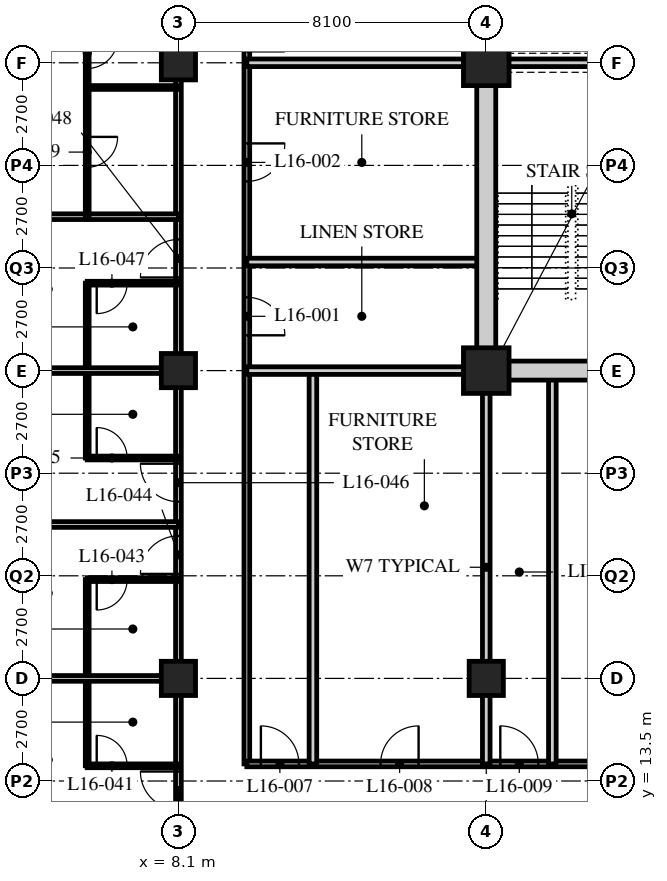
"""IFC4 building model, lengths in metres.
Left out: names, types, materials, properties, quantities, classifications, styles, units other than length and angle.
Written with IfcOpenShell. Run it as: python <this file> out.ifc"""

import sys

from ifc_helpers import new_model, si_unit, direction, frame, frame_2d, origin, origin_2d, place, context, subcontext, project, spatial, rectangle, hollow_rectangle, extrude, element, fill, save


model = new_model("IFC4")
c1 = context("Model", 3, precision=1e-05, world=origin(), true_north=direction((0.0, 1.0)))
c2 = subcontext(c1, "Body", "Model", "MODEL_VIEW")
j1 = project(units=[si_unit("LENGTHUNIT", "METRE"), si_unit("PLANEANGLEUNIT", "RADIAN")], contexts=[c1])
p1 = place(None, origin())
s1 = spatial("IfcSite", under=j1, at=p1, CompositionType="ELEMENT")
p2 = place(p1, origin())
s2 = spatial("IfcBuilding", under=s1, at=p2, CompositionType="ELEMENT")
p3 = place(p2, frame((0.0, 0.0, 67.0)))
s3 = spatial("IfcBuildingStorey", under=s2, at=p3, CompositionType="ELEMENT", Elevation=67.0)
for number, where, z_axis, x_axis in (
    (1, (8.1, 16.2, 0.0), (0.0, 0.0, 1.0), (1.0, 0.0, 0.0)),
    (2, (8.1, 24.3, 0.0), (0.0, 0.0, 1.0), (1.0, 0.0, 0.0)),
    (3, (8.1, 32.4, 0.0), (0.0, 0.0, 1.0), (1.0, 0.0, 0.0)),
    (4, (16.2, 16.2, 0.0), (0.0, 0.0, 1.0), (1.0, 0.0, 0.0)),
):
    element("IfcColumn", number, at=place(p3, frame(where, z_axis=z_axis, x_axis=x_axis)), inside=s3, PredefinedType="COLUMN", context=c2, shape_type="SweptSolid", body=[
        extrude(hollow_rectangle(XDim=0.9, YDim=0.9, WallThickness=0.09, at=origin_2d()), origin(), (0.0, 0.0, 1.0), 3.4),
    ])
for number, where, z_axis, x_axis in (
    (5, (16.2, 24.3, 0.0), (0.0, 0.0, 1.0), (1.0, 0.0, 0.0)),
    (6, (16.2, 32.4, 0.0), (0.0, 0.0, 1.0), (1.0, 0.0, 0.0)),
):
    element("IfcColumn", number, at=place(p3, frame(where, z_axis=z_axis, x_axis=x_axis)), inside=s3, PredefinedType="COLUMN", context=c2, shape_type="SweptSolid", body=[
        extrude(hollow_rectangle(XDim=1.2, YDim=1.2, WallThickness=0.12, at=origin_2d()), origin(), (0.0, 0.0, 1.0), 3.4),
    ])
p4 = place(p3, frame((8.1, 12.15, 0.0), z_axis=(0.0, 0.0, 1.0), x_axis=(0.0, 1.0, 0.0)))
e7 = element("IfcWall", 7, at=p4, inside=s3, PredefinedType="PARTITIONING", context=c2, shape_type="SweptSolid", body=[
    extrude(rectangle(XDim=30.15, YDim=0.15, at=frame_2d((15.075, 0.0))), origin(), (0.0, 0.0, 1.0), 2.578),
])
p5 = place(p4, frame((0.6, 0.0, 0.0)))
e8 = element("IfcOpeningElement", 8, at=p5, cuts=e7, PredefinedType="OPENING", context=c2, shape_type="SweptSolid", body=[
    extrude(rectangle(XDim=1.0, YDim=2.1, at=frame_2d((0.5, 1.05))), frame((0.0, 0.085, 0.0), z_axis=(0.0, -1.0, 0.0), x_axis=(1.0, 0.0, 0.0)), (0.0, 0.0, 1.0), 0.17),
])
p6 = place(p4, frame((6.8, 0.0, 0.0)))
e9 = element("IfcOpeningElement", 9, at=p6, cuts=e7, PredefinedType="OPENING", context=c2, shape_type="SweptSolid", body=[
    extrude(rectangle(XDim=1.0, YDim=2.1, at=frame_2d((0.5, 1.05))), frame((0.0, 0.085, 0.0), z_axis=(0.0, -1.0, 0.0), x_axis=(1.0, 0.0, 0.0)), (0.0, 0.0, 1.0), 0.17),
])
p7 = place(p4, frame((8.7, 0.0, 0.0)))
e10 = element("IfcOpeningElement", 10, at=p7, cuts=e7, PredefinedType="OPENING", context=c2, shape_type="SweptSolid", body=[
    extrude(rectangle(XDim=1.0, YDim=2.1, at=frame_2d((0.5, 1.05))), frame((0.0, 0.085, 0.0), z_axis=(0.0, -1.0, 0.0), x_axis=(1.0, 0.0, 0.0)), (0.0, 0.0, 1.0), 0.17),
])
p8 = place(p4, frame((14.6, 0.0, 0.0)))
e11 = element("IfcOpeningElement", 11, at=p8, cuts=e7, PredefinedType="OPENING", context=c2, shape_type="SweptSolid", body=[
    extrude(rectangle(XDim=1.0, YDim=2.1, at=frame_2d((0.5, 1.05))), frame((0.0, 0.085, 0.0), z_axis=(0.0, -1.0, 0.0), x_axis=(1.0, 0.0, 0.0)), (0.0, 0.0, 1.0), 0.17),
])
p9 = place(p4, frame((21.65, 0.0, 0.0)))
e12 = element("IfcOpeningElement", 12, at=p9, cuts=e7, PredefinedType="OPENING", context=c2, shape_type="SweptSolid", body=[
    extrude(rectangle(XDim=1.0, YDim=2.1, at=frame_2d((0.5, 1.05))), frame((0.0, 0.085, 0.0), z_axis=(0.0, -1.0, 0.0), x_axis=(1.0, 0.0, 0.0)), (0.0, 0.0, 1.0), 0.17),
])
p10 = place(p4, frame((26.75, 0.0, 0.0)))
e13 = element("IfcOpeningElement", 13, at=p10, cuts=e7, PredefinedType="OPENING", context=c2, shape_type="SweptSolid", body=[
    extrude(rectangle(XDim=1.0, YDim=2.1, at=frame_2d((0.5, 1.05))), frame((0.0, 0.085, 0.0), z_axis=(0.0, -1.0, 0.0), x_axis=(1.0, 0.0, 0.0)), (0.0, 0.0, 1.0), 0.17),
])
p11 = place(p3, frame((9.9, 40.5, 0.0), z_axis=(0.0, 0.0, 1.0), x_axis=(0.0, -1.0, 0.0)))
e14 = element("IfcWall", 14, at=p11, inside=s3, PredefinedType="PARTITIONING", context=c2, shape_type="SweptSolid", body=[
    extrude(rectangle(XDim=26.55, YDim=0.15, at=frame_2d((13.275, 0.0))), origin(), (0.0, 0.0, 1.0), 3.19),
])
p12 = place(p11, frame((14.271, 0.0, 0.0)))
e15 = element("IfcOpeningElement", 15, at=p12, cuts=e14, PredefinedType="OPENING", context=c2, shape_type="SweptSolid", body=[
    extrude(rectangle(XDim=1.0, YDim=2.1, at=frame_2d((0.5, 1.05))), frame((0.0, 0.085, 0.0), z_axis=(0.0, -1.0, 0.0), x_axis=(1.0, 0.0, 0.0)), (0.0, 0.0, 1.0), 0.17),
])
p13 = place(p11, frame((10.221, 0.0, 0.0)))
e16 = element("IfcOpeningElement", 16, at=p13, cuts=e14, PredefinedType="OPENING", context=c2, shape_type="SweptSolid", body=[
    extrude(rectangle(XDim=1.0, YDim=2.1, at=frame_2d((0.5, 1.05))), frame((0.0, 0.085, 0.0), z_axis=(0.0, -1.0, 0.0), x_axis=(1.0, 0.0, 0.0)), (0.0, 0.0, 1.0), 0.17),
])
p14 = place(p11, frame((6.8, 0.0, 0.0)))
e17 = element("IfcOpeningElement", 17, at=p14, cuts=e14, PredefinedType="OPENING", context=c2, shape_type="SweptSolid", body=[
    extrude(rectangle(XDim=1.0, YDim=2.1, at=frame_2d((0.5, 1.05))), frame((0.0, 0.085, 0.0), z_axis=(0.0, -1.0, 0.0), x_axis=(1.0, 0.0, 0.0)), (0.0, 0.0, 1.0), 0.17),
])
p15 = place(p11, frame((2.75, 0.0, 0.0)))
e18 = element("IfcOpeningElement", 18, at=p15, cuts=e14, PredefinedType="OPENING", context=c2, shape_type="SweptSolid", body=[
    extrude(rectangle(XDim=1.0, YDim=2.1, at=frame_2d((0.5, 1.05))), frame((0.0, 0.085, 0.0), z_axis=(0.0, -1.0, 0.0), x_axis=(1.0, 0.0, 0.0)), (0.0, 0.0, 1.0), 0.17),
])
p16 = place(p3, frame((9.9, 13.95, 0.0), z_axis=(0.0, 0.0, 1.0), x_axis=(1.0, 0.0, 0.0)))
e19 = element("IfcWall", 19, at=p16, inside=s3, PredefinedType="PARTITIONING", context=c2, shape_type="SweptSolid", body=[
    extrude(rectangle(XDim=17.24, YDim=0.15, at=frame_2d((8.62, 0.0))), origin(), (0.0, 0.0, 1.0), 3.19),
])
p17 = place(p16, frame((0.37, 0.0, 0.0)))
e20 = element("IfcOpeningElement", 20, at=p17, cuts=e19, PredefinedType="OPENING", context=c2, shape_type="SweptSolid", body=[
    extrude(rectangle(XDim=1.0, YDim=2.1, at=frame_2d((0.5, 1.05))), frame((0.0, 0.085, 0.0), z_axis=(0.0, -1.0, 0.0), x_axis=(1.0, 0.0, 0.0)), (0.0, 0.0, 1.0), 0.17),
])
p18 = place(p16, frame((3.52, 0.0, 0.0)))
e21 = element("IfcOpeningElement", 21, at=p18, cuts=e19, PredefinedType="OPENING", context=c2, shape_type="SweptSolid", body=[
    extrude(rectangle(XDim=1.0, YDim=2.1, at=frame_2d((0.5, 1.05))), frame((0.0, 0.085, 0.0), z_axis=(0.0, -1.0, 0.0), x_axis=(1.0, 0.0, 0.0)), (0.0, 0.0, 1.0), 0.17),
])
p19 = place(p16, frame((6.67, 0.0, 0.0)))
e22 = element("IfcOpeningElement", 22, at=p19, cuts=e19, PredefinedType="OPENING", context=c2, shape_type="SweptSolid", body=[
    extrude(rectangle(XDim=1.0, YDim=2.1, at=frame_2d((0.5, 1.05))), frame((0.0, 0.085, 0.0), z_axis=(0.0, -1.0, 0.0), x_axis=(1.0, 0.0, 0.0)), (0.0, 0.0, 1.0), 0.17),
])
p20 = place(p16, frame((9.842, 0.0, 0.0)))
e23 = element("IfcOpeningElement", 23, at=p20, cuts=e19, PredefinedType="OPENING", context=c2, shape_type="SweptSolid", body=[
    extrude(rectangle(XDim=1.0, YDim=2.1, at=frame_2d((0.5, 1.05))), frame((0.0, 0.085, 0.0), z_axis=(0.0, -1.0, 0.0), x_axis=(1.0, 0.0, 0.0)), (0.0, 0.0, 1.0), 0.17),
])
p21 = place(p16, frame((14.447, 0.0, 0.0)))
e24 = element("IfcOpeningElement", 24, at=p21, cuts=e19, PredefinedType="OPENING", context=c2, shape_type="SweptSolid", body=[
    extrude(rectangle(XDim=1.0, YDim=2.1, at=frame_2d((0.5, 1.05))), frame((0.0, 0.085, 0.0), z_axis=(0.0, -1.0, 0.0), x_axis=(1.0, 0.0, 0.0)), (0.0, 0.0, 1.0), 0.17),
])
p22 = place(p3, frame((9.9, 32.4, 0.0), z_axis=(0.0, 0.0, 1.0), x_axis=(1.0, 0.0, 0.0)))
e25 = element("IfcWall", 25, at=p22, inside=s3, PredefinedType="SOLIDWALL", context=c2, shape_type="SweptSolid", body=[
    extrude(rectangle(XDim=6.3, YDim=0.2, at=frame_2d((3.15, 0.0))), origin(), (0.0, 0.0, 1.0), 2.578),
])
p23 = place(p3, frame((9.9, 27.157, 0.0), z_axis=(0.0, 0.0, 1.0), x_axis=(1.0, 0.0, 0.0)))
e26 = element("IfcWall", 26, at=p23, inside=s3, PredefinedType="SOLIDWALL", context=c2, shape_type="SweptSolid", body=[
    extrude(rectangle(XDim=6.3, YDim=0.2, at=frame_2d((3.15, 0.0))), origin(), (0.0, 0.0, 1.0), 3.19),
])
p24 = place(p3, frame((16.2, 13.95, 0.0), z_axis=(0.0, 0.0, 1.0), x_axis=(0.0, 1.0, 0.0)))
e27 = element("IfcWall", 27, at=p24, inside=s3, PredefinedType="SOLIDWALL", context=c2, shape_type="SweptSolid", body=[
    extrude(rectangle(XDim=10.35, YDim=0.2, at=frame_2d((5.175, 0.0))), origin(), (0.0, 0.0, 1.0), 2.578),
])
for number, where, z_axis, x_axis in (
    (28, (11.639, 13.95, 0.0), (0.0, 0.0, 1.0), (0.0, 1.0, 0.0)),
    (29, (17.939, 13.95, 0.0), (0.0, 0.0, 1.0), (0.0, 1.0, 0.0)),
):
    element("IfcWall", number, at=place(p3, frame(where, z_axis=z_axis, x_axis=x_axis)), inside=s3, PredefinedType="SOLIDWALL", context=c2, shape_type="SweptSolid", body=[
        extrude(rectangle(XDim=10.35, YDim=0.2, at=frame_2d((5.175, 0.0))), origin(), (0.0, 0.0, 1.0), 3.19),
    ])
p25 = place(p3, frame((9.9, 24.3, 0.0), z_axis=(0.0, 0.0, 1.0), x_axis=(1.0, 0.0, 0.0)))
e30 = element("IfcWall", 30, at=p25, inside=s3, PredefinedType="SOLIDWALL", context=c2, shape_type="SweptSolid", body=[
    extrude(rectangle(XDim=6.3, YDim=0.2, at=frame_2d((3.15, 0.0))), origin(), (0.0, 0.0, 1.0), 2.578),
])
p26 = place(p3, frame((5.7, 13.9, 0.0), z_axis=(0.0, 0.0, 1.0), x_axis=(0.0, 1.0, 0.0)))
e31 = element("IfcWall", 31, at=p26, inside=s3, PredefinedType="PARTITIONING", context=c2, shape_type="SweptSolid", body=[
    extrude(rectangle(XDim=4.9, YDim=0.1, at=frame_2d((2.45, 0.0))), origin(), (0.0, 0.0, 1.0), 3.19),
])
p27 = place(p3, frame((8.1, 13.9, 0.0), z_axis=(0.0, 0.0, 1.0), x_axis=(-1.0, 0.0, 0.0)))
e32 = element("IfcWall", 32, at=p27, inside=s3, PredefinedType="PARTITIONING", context=c2, shape_type="SweptSolid", body=[
    extrude(rectangle(XDim=2.4, YDim=0.1, at=frame_2d((1.2, 0.0))), origin(), (0.0, 0.0, 1.0), 3.19),
])
p28 = place(p27, frame((1.35, 0.0, 0.0)))
e33 = element("IfcOpeningElement", 33, at=p28, cuts=e32, PredefinedType="OPENING", context=c2, shape_type="SweptSolid", body=[
    extrude(rectangle(XDim=0.8, YDim=2.1, at=frame_2d((0.4, 1.05))), frame((0.0, 0.06, 0.0), z_axis=(0.0, -1.0, 0.0), x_axis=(1.0, 0.0, 0.0)), (0.0, 0.0, 1.0), 0.12),
])
p29 = place(p3, frame((8.1, 16.2, 0.0), z_axis=(0.0, 0.0, 1.0), x_axis=(-1.0, 0.0, 0.0)))
e34 = element("IfcWall", 34, at=p29, inside=s3, PredefinedType="PARTITIONING", context=c2, shape_type="SweptSolid", body=[
    extrude(rectangle(XDim=7.8, YDim=0.15, at=frame_2d((3.9, 0.0))), origin(), (0.0, 0.0, 1.0), 2.578),
])
p30 = place(p3, frame((8.1, 18.8, 0.0), z_axis=(0.0, 0.0, 1.0), x_axis=(-1.0, 0.0, 0.0)))
e35 = element("IfcWall", 35, at=p30, inside=s3, PredefinedType="PARTITIONING", context=c2, shape_type="SweptSolid", body=[
    extrude(rectangle(XDim=2.4, YDim=0.1, at=frame_2d((1.2, 0.0))), origin(), (0.0, 0.0, 1.0), 3.19),
])
p31 = place(p30, frame((1.35, 0.0, 0.0)))
e36 = element("IfcOpeningElement", 36, at=p31, cuts=e35, PredefinedType="OPENING", context=c2, shape_type="SweptSolid", body=[
    extrude(rectangle(XDim=0.8, YDim=2.1, at=frame_2d((0.4, 1.05))), frame((0.0, 0.06, 0.0), z_axis=(0.0, -1.0, 0.0), x_axis=(1.0, 0.0, 0.0)), (0.0, 0.0, 1.0), 0.12),
])
p32 = place(p3, frame((8.1, 20.25, 0.0), z_axis=(0.0, 0.0, 1.0), x_axis=(-1.0, 0.0, 0.0)))
e37 = element("IfcWall", 37, at=p32, inside=s3, PredefinedType="PARTITIONING", context=c2, shape_type="SweptSolid", body=[
    extrude(rectangle(XDim=7.8, YDim=0.15, at=frame_2d((3.9, 0.0))), origin(), (0.0, 0.0, 1.0), 3.19),
])
p33 = place(p3, frame((5.7, 22.0, 0.0), z_axis=(0.0, 0.0, 1.0), x_axis=(0.0, 1.0, 0.0)))
e38 = element("IfcWall", 38, at=p33, inside=s3, PredefinedType="PARTITIONING", context=c2, shape_type="SweptSolid", body=[
    extrude(rectangle(XDim=4.6, YDim=0.1, at=frame_2d((2.3, 0.0))), origin(), (0.0, 0.0, 1.0), 3.19),
])
p34 = place(p3, frame((8.1, 22.0, 0.0), z_axis=(0.0, 0.0, 1.0), x_axis=(-1.0, 0.0, 0.0)))
e39 = element("IfcWall", 39, at=p34, inside=s3, PredefinedType="PARTITIONING", context=c2, shape_type="SweptSolid", body=[
    extrude(rectangle(XDim=2.4, YDim=0.1, at=frame_2d((1.2, 0.0))), origin(), (0.0, 0.0, 1.0), 3.19),
])
p35 = place(p34, frame((1.35, 0.0, 0.0)))
e40 = element("IfcOpeningElement", 40, at=p35, cuts=e39, PredefinedType="OPENING", context=c2, shape_type="SweptSolid", body=[
    extrude(rectangle(XDim=0.8, YDim=2.1, at=frame_2d((0.4, 1.05))), frame((0.0, 0.06, 0.0), z_axis=(0.0, -1.0, 0.0), x_axis=(1.0, 0.0, 0.0)), (0.0, 0.0, 1.0), 0.12),
])
p36 = place(p3, frame((8.1, 24.3, 0.0), z_axis=(0.0, 0.0, 1.0), x_axis=(-1.0, 0.0, 0.0)))
e41 = element("IfcWall", 41, at=p36, inside=s3, PredefinedType="PARTITIONING", context=c2, shape_type="SweptSolid", body=[
    extrude(rectangle(XDim=7.8, YDim=0.15, at=frame_2d((3.9, 0.0))), origin(), (0.0, 0.0, 1.0), 2.578),
])
p37 = place(p3, frame((8.1, 26.6, 0.0), z_axis=(0.0, 0.0, 1.0), x_axis=(-1.0, 0.0, 0.0)))
e42 = element("IfcWall", 42, at=p37, inside=s3, PredefinedType="PARTITIONING", context=c2, shape_type="SweptSolid", body=[
    extrude(rectangle(XDim=2.4, YDim=0.1, at=frame_2d((1.2, 0.0))), origin(), (0.0, 0.0, 1.0), 3.19),
])
p38 = place(p37, frame((1.35, 0.0, 0.0)))
e43 = element("IfcOpeningElement", 43, at=p38, cuts=e42, PredefinedType="OPENING", context=c2, shape_type="SweptSolid", body=[
    extrude(rectangle(XDim=0.8, YDim=2.1, at=frame_2d((0.4, 1.05))), frame((0.0, 0.06, 0.0), z_axis=(0.0, -1.0, 0.0), x_axis=(1.0, 0.0, 0.0)), (0.0, 0.0, 1.0), 0.12),
])
p39 = place(p3, frame((8.1, 28.35, 0.0), z_axis=(0.0, 0.0, 1.0), x_axis=(-1.0, 0.0, 0.0)))
e44 = element("IfcWall", 44, at=p39, inside=s3, PredefinedType="PARTITIONING", context=c2, shape_type="SweptSolid", body=[
    extrude(rectangle(XDim=7.8, YDim=0.15, at=frame_2d((3.9, 0.0))), origin(), (0.0, 0.0, 1.0), 3.19),
])
p40 = place(p3, frame((5.7, 28.35, 0.0), z_axis=(0.0, 0.0, 1.0), x_axis=(0.0, 1.0, 0.0)))
e45 = element("IfcWall", 45, at=p40, inside=s3, PredefinedType="PARTITIONING", context=c2, shape_type="SweptSolid", body=[
    extrude(rectangle(XDim=5.2, YDim=0.1, at=frame_2d((2.6, 0.0))), origin(), (0.0, 0.0, 1.0), 3.19),
])
p41 = place(p40, frame((1.3, 0.0, 0.0)))
e46 = element("IfcOpeningElement", 46, at=p41, cuts=e45, PredefinedType="OPENING", context=c2, shape_type="SweptSolid", body=[
    extrude(rectangle(XDim=0.8, YDim=2.1, at=frame_2d((0.4, 1.05))), frame((0.0, 0.06, 0.0), z_axis=(0.0, -1.0, 0.0), x_axis=(1.0, 0.0, 0.0)), (0.0, 0.0, 1.0), 0.12),
])
p42 = place(p40, frame((3.9, 0.0, 0.0)))
e47 = element("IfcOpeningElement", 47, at=p42, cuts=e45, PredefinedType="OPENING", context=c2, shape_type="SweptSolid", body=[
    extrude(rectangle(XDim=0.8, YDim=2.1, at=frame_2d((0.4, 1.05))), frame((0.0, 0.06, 0.0), z_axis=(0.0, -1.0, 0.0), x_axis=(1.0, 0.0, 0.0)), (0.0, 0.0, 1.0), 0.12),
])
p43 = place(p3, frame((8.1, 31.75, 0.0), z_axis=(0.0, 0.0, 1.0), x_axis=(-1.0, 0.0, 0.0)))
e48 = element("IfcWall", 48, at=p43, inside=s3, PredefinedType="PARTITIONING", context=c2, shape_type="SweptSolid", body=[
    extrude(rectangle(XDim=2.4, YDim=0.1, at=frame_2d((1.2, 0.0))), origin(), (0.0, 0.0, 1.0), 3.19),
])
p44 = place(p3, frame((15.95, 24.3, 0.0), z_axis=(0.0, 0.0, 1.0), x_axis=(1.0, 0.0, 0.0)))
e49 = element("IfcWall", 49, at=p44, inside=s3, PredefinedType="SOLIDWALL", context=c2, shape_type="SweptSolid", body=[
    extrude(rectangle(XDim=24.8, YDim=0.5, at=frame_2d((12.4, 0.0))), origin(), (0.0, 0.0, 1.0), 2.54),
])
p45 = place(p44, frame((11.5, 0.0, 0.0)))
e50 = element("IfcOpeningElement", 50, at=p45, cuts=e49, PredefinedType="OPENING", context=c2, shape_type="SweptSolid", body=[
    extrude(rectangle(XDim=1.8, YDim=2.4, at=frame_2d((0.9, 1.2))), frame((0.0, 0.26, 0.0), z_axis=(0.0, -1.0, 0.0), x_axis=(1.0, 0.0, 0.0)), (0.0, 0.0, 1.0), 0.52),
])
p46 = place(p3, frame((16.2, 24.55, 0.0), z_axis=(0.0, 0.0, 1.0), x_axis=(0.0, 1.0, 0.0)))
e51 = element("IfcWall", 51, at=p46, inside=s3, PredefinedType="SOLIDWALL", context=c2, shape_type="SweptSolid", body=[
    extrude(rectangle(XDim=15.7, YDim=0.5, at=frame_2d((7.85, 0.0))), origin(), (0.0, 0.0, 1.0), 2.578),
])
p47 = place(p3, frame((16.45, 32.4, 0.0), z_axis=(0.0, 0.0, 1.0), x_axis=(1.0, 0.0, 0.0)))
e52 = element("IfcWall", 52, at=p47, inside=s3, PredefinedType="SOLIDWALL", context=c2, shape_type="SweptSolid", body=[
    extrude(rectangle(XDim=7.95, YDim=0.2, at=frame_2d((3.975, 0.0))), origin(), (0.0, 0.0, 1.0), 2.578),
])
p48 = place(p12, origin())
e53 = element("IfcDoor", 53, at=p48, inside=s3, OperationType="SINGLE_SWING_RIGHT", PredefinedType="DOOR", context=c2, shape_type="SweptSolid", body=[
    extrude(rectangle(XDim=1.0, YDim=2.1, at=frame_2d((0.5, 1.05))), frame((0.0, 0.025, 0.0), z_axis=(0.0, -1.0, 0.0), x_axis=(1.0, 0.0, 0.0)), (0.0, 0.0, 1.0), 0.05),
])
fill(e15, e53)
p49 = place(p13, origin())
e54 = element("IfcDoor", 54, at=p49, inside=s3, OperationType="SINGLE_SWING_LEFT", PredefinedType="DOOR", context=c2, shape_type="SweptSolid", body=[
    extrude(rectangle(XDim=1.0, YDim=2.1, at=frame_2d((0.5, 1.05))), frame((0.0, 0.025, 0.0), z_axis=(0.0, -1.0, 0.0), x_axis=(1.0, 0.0, 0.0)), (0.0, 0.0, 1.0), 0.05),
])
fill(e16, e54)
p50 = place(p17, origin())
e55 = element("IfcDoor", 55, at=p50, inside=s3, OperationType="SINGLE_SWING_LEFT", PredefinedType="DOOR", context=c2, shape_type="SweptSolid", body=[
    extrude(rectangle(XDim=1.0, YDim=2.1, at=frame_2d((0.5, 1.05))), frame((0.0, 0.025, 0.0), z_axis=(0.0, -1.0, 0.0), x_axis=(1.0, 0.0, 0.0)), (0.0, 0.0, 1.0), 0.05),
])
fill(e20, e55)
p51 = place(p18, origin())
e56 = element("IfcDoor", 56, at=p51, inside=s3, OperationType="SINGLE_SWING_RIGHT", PredefinedType="DOOR", context=c2, shape_type="SweptSolid", body=[
    extrude(rectangle(XDim=1.0, YDim=2.1, at=frame_2d((0.5, 1.05))), frame((0.0, 0.025, 0.0), z_axis=(0.0, -1.0, 0.0), x_axis=(1.0, 0.0, 0.0)), (0.0, 0.0, 1.0), 0.05),
])
fill(e21, e56)
p52 = place(p19, origin())
e57 = element("IfcDoor", 57, at=p52, inside=s3, OperationType="SINGLE_SWING_LEFT", PredefinedType="DOOR", context=c2, shape_type="SweptSolid", body=[
    extrude(rectangle(XDim=1.0, YDim=2.1, at=frame_2d((0.5, 1.05))), frame((0.0, 0.025, 0.0), z_axis=(0.0, -1.0, 0.0), x_axis=(1.0, 0.0, 0.0)), (0.0, 0.0, 1.0), 0.05),
])
fill(e22, e57)
p53 = place(p28, origin())
e58 = element("IfcDoor", 58, at=p53, inside=s3, OperationType="SINGLE_SWING_LEFT", PredefinedType="DOOR", context=c2, shape_type="SweptSolid", body=[
    extrude(rectangle(XDim=0.8, YDim=2.1, at=frame_2d((0.4, 1.05))), frame((0.0, 0.025, 0.0), z_axis=(0.0, -1.0, 0.0), x_axis=(1.0, 0.0, 0.0)), (0.0, 0.0, 1.0), 0.05),
])
fill(e33, e58)
p54 = place(p5, origin())
e59 = element("IfcDoor", 59, at=p54, inside=s3, OperationType="SINGLE_SWING_RIGHT", PredefinedType="DOOR", context=c2, shape_type="SweptSolid", body=[
    extrude(rectangle(XDim=1.0, YDim=2.1, at=frame_2d((0.5, 1.05))), frame((0.0, 0.025, 0.0), z_axis=(0.0, -1.0, 0.0), x_axis=(1.0, 0.0, 0.0)), (0.0, 0.0, 1.0), 0.05),
])
fill(e8, e59)
p55 = place(p31, origin())
e60 = element("IfcDoor", 60, at=p55, inside=s3, OperationType="SINGLE_SWING_RIGHT", PredefinedType="DOOR", context=c2, shape_type="SweptSolid", body=[
    extrude(rectangle(XDim=0.8, YDim=2.1, at=frame_2d((0.4, 1.05))), frame((0.0, 0.025, 0.0), z_axis=(0.0, -1.0, 0.0), x_axis=(1.0, 0.0, 0.0)), (0.0, 0.0, 1.0), 0.05),
])
fill(e36, e60)
p56 = place(p6, origin())
e61 = element("IfcDoor", 61, at=p56, inside=s3, OperationType="SINGLE_SWING_LEFT", PredefinedType="DOOR", context=c2, shape_type="SweptSolid", body=[
    extrude(rectangle(XDim=1.0, YDim=2.1, at=frame_2d((0.5, 1.05))), frame((0.0, 0.025, 0.0), z_axis=(0.0, -1.0, 0.0), x_axis=(1.0, 0.0, 0.0)), (0.0, 0.0, 1.0), 0.05),
])
fill(e9, e61)
p57 = place(p35, origin())
e62 = element("IfcDoor", 62, at=p57, inside=s3, OperationType="SINGLE_SWING_LEFT", PredefinedType="DOOR", context=c2, shape_type="SweptSolid", body=[
    extrude(rectangle(XDim=0.8, YDim=2.1, at=frame_2d((0.4, 1.05))), frame((0.0, 0.025, 0.0), z_axis=(0.0, -1.0, 0.0), x_axis=(1.0, 0.0, 0.0)), (0.0, 0.0, 1.0), 0.05),
])
fill(e40, e62)
p58 = place(p7, origin())
e63 = element("IfcDoor", 63, at=p58, inside=s3, OperationType="SINGLE_SWING_RIGHT", PredefinedType="DOOR", context=c2, shape_type="SweptSolid", body=[
    extrude(rectangle(XDim=1.0, YDim=2.1, at=frame_2d((0.5, 1.05))), frame((0.0, 0.025, 0.0), z_axis=(0.0, -1.0, 0.0), x_axis=(1.0, 0.0, 0.0)), (0.0, 0.0, 1.0), 0.05),
])
fill(e10, e63)
p59 = place(p38, origin())
e64 = element("IfcDoor", 64, at=p59, inside=s3, OperationType="SINGLE_SWING_RIGHT", PredefinedType="DOOR", context=c2, shape_type="SweptSolid", body=[
    extrude(rectangle(XDim=0.8, YDim=2.1, at=frame_2d((0.4, 1.05))), frame((0.0, 0.025, 0.0), z_axis=(0.0, -1.0, 0.0), x_axis=(1.0, 0.0, 0.0)), (0.0, 0.0, 1.0), 0.05),
])
fill(e43, e64)
p60 = place(p8, origin())
e65 = element("IfcDoor", 65, at=p60, inside=s3, OperationType="SINGLE_SWING_LEFT", PredefinedType="DOOR", context=c2, shape_type="SweptSolid", body=[
    extrude(rectangle(XDim=1.0, YDim=2.1, at=frame_2d((0.5, 1.05))), frame((0.0, 0.025, 0.0), z_axis=(0.0, -1.0, 0.0), x_axis=(1.0, 0.0, 0.0)), (0.0, 0.0, 1.0), 0.05),
])
fill(e11, e65)
p61 = place(p41, origin())
e66 = element("IfcDoor", 66, at=p61, inside=s3, OperationType="SINGLE_SWING_LEFT", PredefinedType="DOOR", context=c2, shape_type="SweptSolid", body=[
    extrude(rectangle(XDim=0.8, YDim=2.1, at=frame_2d((0.4, 1.05))), frame((0.0, 0.025, 0.0), z_axis=(0.0, -1.0, 0.0), x_axis=(1.0, 0.0, 0.0)), (0.0, 0.0, 1.0), 0.05),
])
fill(e46, e66)
p62 = place(p42, origin())
e67 = element("IfcDoor", 67, at=p62, inside=s3, OperationType="SINGLE_SWING_LEFT", PredefinedType="DOOR", context=c2, shape_type="SweptSolid", body=[
    extrude(rectangle(XDim=0.8, YDim=2.1, at=frame_2d((0.4, 1.05))), frame((0.0, 0.025, 0.0), z_axis=(0.0, -1.0, 0.0), x_axis=(1.0, 0.0, 0.0)), (0.0, 0.0, 1.0), 0.05),
])
fill(e47, e67)
save(model, sys.argv[1])
